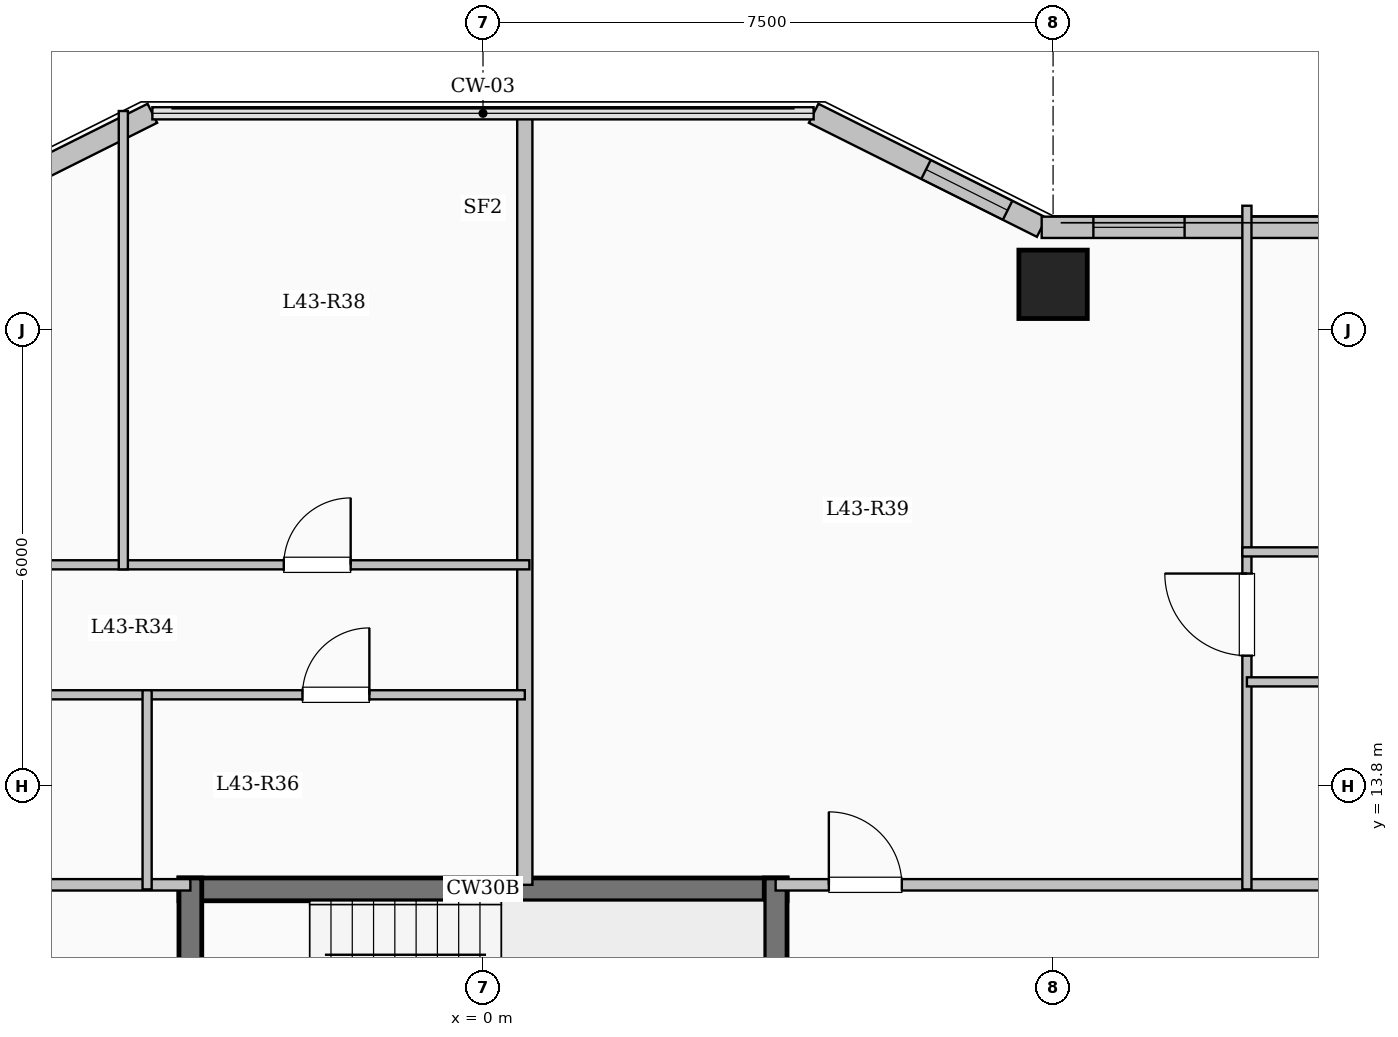
"""IFC4 building model, lengths in metres.
Left out: names, types, materials, properties, quantities, classifications, styles, units other than length and angle.
Written with IfcOpenShell. Run it as: python <this file> out.ifc"""

import sys

from ifc_helpers import new_model, si_unit, direction, frame, frame_2d, origin, origin_2d, place, context, subcontext, project, spatial, rectangle, extrude, element, fill, save


model = new_model("IFC4")
c1 = context("Model", 3, precision=1e-05, world=origin(), true_north=direction((0.0, 1.0)))
c2 = subcontext(c1, "Body", "Model", "MODEL_VIEW")
j1 = project(units=[si_unit("LENGTHUNIT", "METRE"), si_unit("PLANEANGLEUNIT", "RADIAN")], contexts=[c1])
p1 = place(None, origin())
s1 = spatial("IfcSite", under=j1, at=p1, CompositionType="ELEMENT")
p2 = place(p1, origin())
s2 = spatial("IfcBuilding", under=s1, at=p2, CompositionType="ELEMENT")
p3 = place(p2, frame((0.0, 0.0, 159.4)))
s3 = spatial("IfcBuildingStorey", under=s2, at=p3, CompositionType="ELEMENT", Elevation=159.4)
p4 = place(p3, frame((7.5, 20.4, 0.0), z_axis=(0.0, 0.0, 1.0), x_axis=(1.0, 0.0, 0.0)))
e1 = element("IfcColumn", 1, at=p4, inside=s3, PredefinedType="COLUMN", context=c2, shape_type="SweptSolid", body=[
    extrude(rectangle(XDim=0.9, YDim=0.9, at=origin_2d()), origin(), (0.0, 0.0, 1.0), 3.35),
])
p5 = place(p3, frame((-7.35, 21.15, 0.0), z_axis=(0.0, 0.0, 1.0), x_axis=(0.894427191, 0.4472135955, 0.0)))
e2 = element("IfcWall", 2, at=p5, inside=s3, PredefinedType="SOLIDWALL", context=c2, shape_type="SweptSolid", body=[
    extrude(rectangle(XDim=3.354, YDim=0.28, at=frame_2d((1.677, 0.0))), origin(), (0.0, 0.0, 1.0), 3.1),
])
p6 = place(p5, frame((0.521, 0.0, 0.95)))
e3 = element("IfcOpeningElement", 3, at=p6, cuts=e2, PredefinedType="OPENING", context=c2, shape_type="SweptSolid", body=[
    extrude(rectangle(XDim=1.2, YDim=1.5, at=frame_2d((0.6, 0.75))), frame((0.0, 0.15, 0.0), z_axis=(0.0, -1.0, 0.0), x_axis=(1.0, 0.0, 0.0)), (0.0, 0.0, 1.0), 0.3),
])
p7 = place(p3, frame((4.35, 22.65, 0.0), z_axis=(0.0, 0.0, 1.0), x_axis=(0.894427191, -0.4472135955, 0.0)))
e4 = element("IfcWall", 4, at=p7, inside=s3, PredefinedType="SOLIDWALL", context=c2, shape_type="SweptSolid", body=[
    extrude(rectangle(XDim=3.354, YDim=0.28, at=frame_2d((1.677, 0.0))), origin(), (0.0, 0.0, 1.0), 3.1),
])
p8 = place(p7, frame((1.653, 0.0, 0.95)))
e5 = element("IfcOpeningElement", 5, at=p8, cuts=e4, PredefinedType="OPENING", context=c2, shape_type="SweptSolid", body=[
    extrude(rectangle(XDim=1.2, YDim=1.5, at=frame_2d((0.6, 0.75))), frame((0.0, 0.15, 0.0), z_axis=(0.0, -1.0, 0.0), x_axis=(1.0, 0.0, 0.0)), (0.0, 0.0, 1.0), 0.3),
])
p9 = place(p3, frame((7.35, 21.15, 0.0), z_axis=(0.0, 0.0, 1.0), x_axis=(1.0, 0.0, 0.0)))
e6 = element("IfcWall", 6, at=p9, inside=s3, PredefinedType="SOLIDWALL", context=c2, shape_type="SweptSolid", body=[
    extrude(rectangle(XDim=12.3, YDim=0.28, at=frame_2d((6.15, 0.0))), origin(), (0.0, 0.0, 1.0), 3.1),
])
p10 = place(p9, frame((0.68, 0.0, 0.95)))
e7 = element("IfcOpeningElement", 7, at=p10, cuts=e6, PredefinedType="OPENING", context=c2, shape_type="SweptSolid", body=[
    extrude(rectangle(XDim=1.2, YDim=1.5, at=frame_2d((0.6, 0.75))), frame((0.0, 0.15, 0.0), z_axis=(0.0, -1.0, 0.0), x_axis=(1.0, 0.0, 0.0)), (0.0, 0.0, 1.0), 0.3),
])
p11 = place(p9, frame((4.22, 0.0, 0.9)))
e8 = element("IfcOpeningElement", 8, at=p11, cuts=e6, PredefinedType="OPENING", context=c2, shape_type="SweptSolid", body=[
    extrude(rectangle(XDim=1.65, YDim=1.6, at=frame_2d((0.825, 0.8))), frame((0.0, 0.15, 0.0), z_axis=(0.0, -1.0, 0.0), x_axis=(1.0, 0.0, 0.0)), (0.0, 0.0, 1.0), 0.3),
])
p12 = place(p9, frame((8.99, 0.0, 0.9)))
e9 = element("IfcOpeningElement", 9, at=p12, cuts=e6, PredefinedType="OPENING", context=c2, shape_type="SweptSolid", body=[
    extrude(rectangle(XDim=1.65, YDim=1.6, at=frame_2d((0.825, 0.8))), frame((0.0, 0.15, 0.0), z_axis=(0.0, -1.0, 0.0), x_axis=(1.0, 0.0, 0.0)), (0.0, 0.0, 1.0), 0.3),
])
p13 = place(p3, frame((-4.0, 12.44, 0.0), z_axis=(0.0, 0.0, 1.0), x_axis=(1.0, 0.0, 0.0)))
e10 = element("IfcWall", 10, at=p13, inside=s3, PredefinedType="SHEAR", context=c2, shape_type="SweptSolid", body=[
    extrude(rectangle(XDim=8.0, YDim=0.3, at=frame_2d((4.0, 0.0))), origin(), (0.0, 0.0, 1.0), 3.35),
])
for number, where, z_axis, x_axis in (
    (11, (-3.85, 9.0, 0.0), (0.0, 0.0, 1.0), (0.0, 1.0, 0.0)),
    (12, (3.85, 9.0, 0.0), (0.0, 0.0, 1.0), (0.0, 1.0, 0.0)),
):
    element("IfcWall", number, at=place(p3, frame(where, z_axis=z_axis, x_axis=x_axis)), inside=s3, PredefinedType="SHEAR", context=c2, shape_type="SweptSolid", body=[
        extrude(rectangle(XDim=3.59, YDim=0.3, at=frame_2d((1.795, 0.0))), origin(), (0.0, 0.0, 1.0), 3.35),
    ])
p14 = place(p3, frame((-19.55, 12.5, 0.0), z_axis=(0.0, 0.0, 1.0), x_axis=(1.0, 0.0, 0.0)))
e13 = element("IfcWall", 13, at=p14, inside=s3, PredefinedType="PARTITIONING", context=c2, shape_type="SweptSolid", body=[
    extrude(rectangle(XDim=15.7, YDim=0.15, at=frame_2d((7.85, 0.0))), origin(), (0.0, 0.0, 1.0), 3.1),
])
p15 = place(p14, frame((0.7, 0.0, 0.0)))
e14 = element("IfcOpeningElement", 14, at=p15, cuts=e13, PredefinedType="OPENING", context=c2, shape_type="SweptSolid", body=[
    extrude(rectangle(XDim=0.96, YDim=2.15, at=frame_2d((0.48, 1.075))), frame((0.0, 0.085, 0.0), z_axis=(0.0, -1.0, 0.0), x_axis=(1.0, 0.0, 0.0)), (0.0, 0.0, 1.0), 0.17),
])
p16 = place(p3, frame((3.85, 12.5, 0.0), z_axis=(0.0, 0.0, 1.0), x_axis=(1.0, 0.0, 0.0)))
e15 = element("IfcWall", 15, at=p16, inside=s3, PredefinedType="PARTITIONING", context=c2, shape_type="SweptSolid", body=[
    extrude(rectangle(XDim=15.7, YDim=0.15, at=frame_2d((7.85, 0.0))), origin(), (0.0, 0.0, 1.0), 3.1),
])
p17 = place(p16, frame((0.7, 0.0, 0.0)))
e16 = element("IfcOpeningElement", 16, at=p17, cuts=e15, PredefinedType="OPENING", context=c2, shape_type="SweptSolid", body=[
    extrude(rectangle(XDim=0.96, YDim=2.15, at=frame_2d((0.48, 1.075))), frame((0.0, 0.085, 0.0), z_axis=(0.0, -1.0, 0.0), x_axis=(1.0, 0.0, 0.0)), (0.0, 0.0, 1.0), 0.17),
])
p18 = place(p3, frame((0.55, 12.5, 0.0), z_axis=(0.0, 0.0, 1.0), x_axis=(0.0, 1.0, 0.0)))
e17 = element("IfcWall", 17, at=p18, inside=s3, PredefinedType="SOLIDWALL", context=c2, shape_type="SweptSolid", body=[
    extrude(rectangle(XDim=10.18, YDim=0.2, at=frame_2d((5.09, 0.0))), origin(), (0.0, 0.0, 1.0), 3.1),
])
p19 = place(p3, frame((-9.955, 15.0, 0.0), z_axis=(0.0, 0.0, 1.0), x_axis=(1.0, 0.0, 0.0)))
e18 = element("IfcWall", 18, at=p19, inside=s3, PredefinedType="PARTITIONING", context=c2, shape_type="SweptSolid", body=[
    extrude(rectangle(XDim=5.536, YDim=0.12, at=frame_2d((2.768, 0.0))), origin(), (0.0, 0.0, 1.0), 3.1),
])
p20 = place(p19, frame((2.328, 0.0, 0.0)))
e19 = element("IfcOpeningElement", 19, at=p20, cuts=e18, PredefinedType="OPENING", context=c2, shape_type="SweptSolid", body=[
    extrude(rectangle(XDim=0.88, YDim=2.1, at=frame_2d((0.44, 1.05))), frame((0.0, 0.07, 0.0), z_axis=(0.0, -1.0, 0.0), x_axis=(1.0, 0.0, 0.0)), (0.0, 0.0, 1.0), 0.14),
])
p21 = place(p3, frame((-4.419, 15.0, 0.0), z_axis=(0.0, 0.0, 1.0), x_axis=(1.0, 0.0, 0.0)))
e20 = element("IfcWall", 20, at=p21, inside=s3, PredefinedType="PARTITIONING", context=c2, shape_type="SweptSolid", body=[
    extrude(rectangle(XDim=4.969, YDim=0.12, at=frame_2d((2.484, 0.0))), origin(), (0.0, 0.0, 1.0), 3.1),
])
p22 = place(p21, frame((2.044, 0.0, 0.0)))
e21 = element("IfcOpeningElement", 21, at=p22, cuts=e20, PredefinedType="OPENING", context=c2, shape_type="SweptSolid", body=[
    extrude(rectangle(XDim=0.88, YDim=2.1, at=frame_2d((0.44, 1.05))), frame((0.0, 0.07, 0.0), z_axis=(0.0, -1.0, 0.0), x_axis=(1.0, 0.0, 0.0)), (0.0, 0.0, 1.0), 0.14),
])
p23 = place(p3, frame((-10.015, 16.71, 0.0), z_axis=(0.0, 0.0, 1.0), x_axis=(1.0, 0.0, 0.0)))
e22 = element("IfcWall", 22, at=p23, inside=s3, PredefinedType="PARTITIONING", context=c2, shape_type="SweptSolid", body=[
    extrude(rectangle(XDim=10.625, YDim=0.12, at=frame_2d((5.312, 0.0))), origin(), (0.0, 0.0, 1.0), 3.1),
])
p24 = place(p23, frame((2.171, 0.0, 0.0)))
e23 = element("IfcOpeningElement", 23, at=p24, cuts=e22, PredefinedType="OPENING", context=c2, shape_type="SweptSolid", body=[
    extrude(rectangle(XDim=0.88, YDim=2.1, at=frame_2d((0.44, 1.05))), frame((0.0, 0.07, 0.0), z_axis=(0.0, -1.0, 0.0), x_axis=(1.0, 0.0, 0.0)), (0.0, 0.0, 1.0), 0.14),
])
p25 = place(p23, frame((7.394, 0.0, 0.0)))
e24 = element("IfcOpeningElement", 24, at=p25, cuts=e22, PredefinedType="OPENING", context=c2, shape_type="SweptSolid", body=[
    extrude(rectangle(XDim=0.88, YDim=2.1, at=frame_2d((0.44, 1.05))), frame((0.0, 0.07, 0.0), z_axis=(0.0, -1.0, 0.0), x_axis=(1.0, 0.0, 0.0)), (0.0, 0.0, 1.0), 0.14),
])
p26 = place(p3, frame((-4.419, 12.44, 0.0), z_axis=(0.0, 0.0, 1.0), x_axis=(0.0, 1.0, 0.0)))
e25 = element("IfcWall", 25, at=p26, inside=s3, PredefinedType="PARTITIONING", context=c2, shape_type="SweptSolid", body=[
    extrude(rectangle(XDim=2.62, YDim=0.12, at=frame_2d((1.31, 0.0))), origin(), (0.0, 0.0, 1.0), 3.1),
])
p27 = place(p3, frame((-4.732, 16.65, 0.0), z_axis=(0.0, 0.0, 1.0), x_axis=(0.0, 1.0, 0.0)))
e26 = element("IfcWall", 26, at=p27, inside=s3, PredefinedType="PARTITIONING", context=c2, shape_type="SweptSolid", body=[
    extrude(rectangle(XDim=6.03, YDim=0.12, at=frame_2d((3.015, 0.0))), origin(), (0.0, 0.0, 1.0), 3.1),
])
p28 = place(p3, frame((10.05, 12.44, 0.0), z_axis=(0.0, 0.0, 1.0), x_axis=(0.0, 1.0, 0.0)))
e27 = element("IfcWall", 27, at=p28, inside=s3, PredefinedType="PARTITIONING", context=c2, shape_type="SweptSolid", body=[
    extrude(rectangle(XDim=8.994, YDim=0.12, at=frame_2d((4.497, 0.0))), origin(), (0.0, 0.0, 1.0), 3.1),
])
p29 = place(p28, frame((3.075, 0.0, 0.0)))
e28 = element("IfcOpeningElement", 28, at=p29, cuts=e27, PredefinedType="OPENING", context=c2, shape_type="SweptSolid", body=[
    extrude(rectangle(XDim=1.08, YDim=2.15, at=frame_2d((0.54, 1.075))), frame((0.0, 0.07, 0.0), z_axis=(0.0, -1.0, 0.0), x_axis=(1.0, 0.0, 0.0)), (0.0, 0.0, 1.0), 0.14),
])
p30 = place(p3, frame((10.05, 15.17, 0.0), z_axis=(0.0, 0.0, 1.0), x_axis=(1.0, 0.0, 0.0)))
e29 = element("IfcWall", 29, at=p30, inside=s3, PredefinedType="PARTITIONING", context=c2, shape_type="SweptSolid", body=[
    extrude(rectangle(XDim=5.381, YDim=0.12, at=frame_2d((2.69, 0.0))), origin(), (0.0, 0.0, 1.0), 3.1),
])
p31 = place(p30, frame((2.25, 0.0, 0.0)))
e30 = element("IfcOpeningElement", 30, at=p31, cuts=e29, PredefinedType="OPENING", context=c2, shape_type="SweptSolid", body=[
    extrude(rectangle(XDim=0.88, YDim=2.1, at=frame_2d((0.44, 1.05))), frame((0.0, 0.07, 0.0), z_axis=(0.0, -1.0, 0.0), x_axis=(1.0, 0.0, 0.0)), (0.0, 0.0, 1.0), 0.14),
])
p32 = place(p3, frame((9.99, 16.88, 0.0), z_axis=(0.0, 0.0, 1.0), x_axis=(1.0, 0.0, 0.0)))
e31 = element("IfcWall", 31, at=p32, inside=s3, PredefinedType="PARTITIONING", context=c2, shape_type="SweptSolid", body=[
    extrude(rectangle(XDim=9.62, YDim=0.12, at=frame_2d((4.81, 0.0))), origin(), (0.0, 0.0, 1.0), 2.685),
])
p33 = place(p32, frame((1.92, 0.0, 0.0)))
e32 = element("IfcOpeningElement", 32, at=p33, cuts=e31, PredefinedType="OPENING", context=c2, shape_type="SweptSolid", body=[
    extrude(rectangle(XDim=0.88, YDim=2.1, at=frame_2d((0.44, 1.05))), frame((0.0, 0.07, 0.0), z_axis=(0.0, -1.0, 0.0), x_axis=(1.0, 0.0, 0.0)), (0.0, 0.0, 1.0), 0.14),
])
p34 = place(p32, frame((6.64, 0.0, 0.0)))
e33 = element("IfcOpeningElement", 33, at=p34, cuts=e31, PredefinedType="OPENING", context=c2, shape_type="SweptSolid", body=[
    extrude(rectangle(XDim=0.88, YDim=2.1, at=frame_2d((0.44, 1.05))), frame((0.0, 0.07, 0.0), z_axis=(0.0, -1.0, 0.0), x_axis=(1.0, 0.0, 0.0)), (0.0, 0.0, 1.0), 0.14),
])
p35 = place(p8, origin())
e34 = element("IfcWindow", 34, at=p35, inside=s3, PartitioningType="SINGLE_PANEL", PredefinedType="WINDOW", context=c2, shape_type="SweptSolid", body=[
    extrude(rectangle(XDim=1.2, YDim=1.5, at=frame_2d((0.6, 0.75))), frame((0.0, 0.03, 0.0), z_axis=(0.0, -1.0, 0.0), x_axis=(1.0, 0.0, 0.0)), (0.0, 0.0, 1.0), 0.06),
])
fill(e5, e34)
p36 = place(p10, origin())
e35 = element("IfcWindow", 35, at=p36, inside=s3, PartitioningType="SINGLE_PANEL", PredefinedType="WINDOW", context=c2, shape_type="SweptSolid", body=[
    extrude(rectangle(XDim=1.2, YDim=1.5, at=frame_2d((0.6, 0.75))), frame((0.0, 0.03, 0.0), z_axis=(0.0, -1.0, 0.0), x_axis=(1.0, 0.0, 0.0)), (0.0, 0.0, 1.0), 0.06),
])
fill(e7, e35)
p37 = place(p22, origin())
e36 = element("IfcDoor", 36, at=p37, inside=s3, OperationType="SINGLE_SWING_RIGHT", PredefinedType="DOOR", context=c2, shape_type="SweptSolid", body=[
    extrude(rectangle(XDim=0.88, YDim=2.1, at=frame_2d((0.44, 1.05))), frame((0.0, 0.025, 0.0), z_axis=(0.0, -1.0, 0.0), x_axis=(1.0, 0.0, 0.0)), (0.0, 0.0, 1.0), 0.05),
])
fill(e21, e36)
p38 = place(p25, origin())
e37 = element("IfcDoor", 37, at=p38, inside=s3, OperationType="SINGLE_SWING_RIGHT", PredefinedType="DOOR", context=c2, shape_type="SweptSolid", body=[
    extrude(rectangle(XDim=0.88, YDim=2.1, at=frame_2d((0.44, 1.05))), frame((0.0, 0.025, 0.0), z_axis=(0.0, -1.0, 0.0), x_axis=(1.0, 0.0, 0.0)), (0.0, 0.0, 1.0), 0.05),
])
fill(e24, e37)
p39 = place(p17, origin())
e38 = element("IfcDoor", 38, at=p39, inside=s3, OperationType="SINGLE_SWING_LEFT", PredefinedType="DOOR", context=c2, shape_type="SweptSolid", body=[
    extrude(rectangle(XDim=0.96, YDim=2.15, at=frame_2d((0.48, 1.075))), frame((0.0, 0.025, 0.0), z_axis=(0.0, -1.0, 0.0), x_axis=(1.0, 0.0, 0.0)), (0.0, 0.0, 1.0), 0.05),
])
fill(e16, e38)
p40 = place(p29, origin())
e39 = element("IfcDoor", 39, at=p40, inside=s3, OperationType="SINGLE_SWING_RIGHT", PredefinedType="DOOR", context=c2, shape_type="SweptSolid", body=[
    extrude(rectangle(XDim=1.08, YDim=2.15, at=frame_2d((0.54, 1.075))), frame((0.0, 0.025, 0.0), z_axis=(0.0, -1.0, 0.0), x_axis=(1.0, 0.0, 0.0)), (0.0, 0.0, 1.0), 0.05),
])
fill(e28, e39)
save(model, sys.argv[1])
